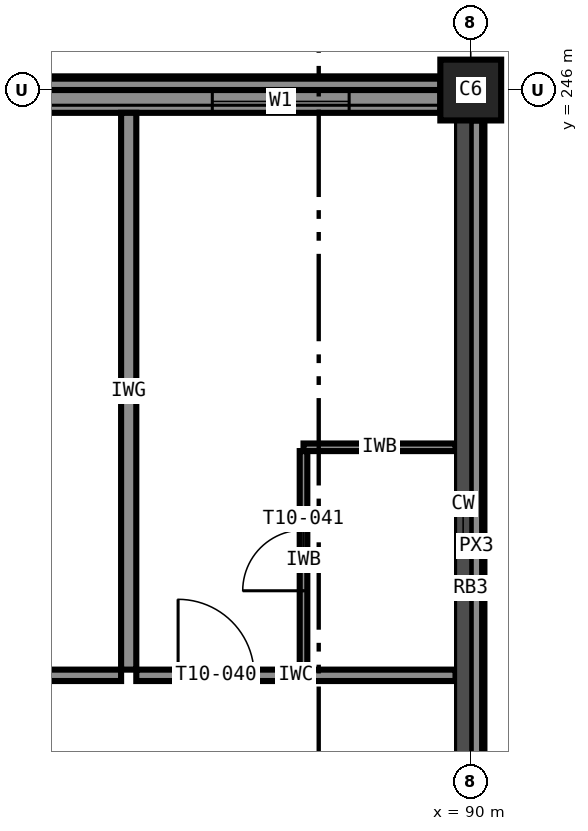
"""IFC4 building model, lengths in metres.
Left out: names, types, materials, properties, quantities, classifications, styles, units other than length and angle.
Written with IfcOpenShell. Run it as: python <this file> out.ifc"""

import sys

from ifc_helpers import new_model, si_unit, direction, frame, frame_2d, origin, origin_2d, place, context, subcontext, project, spatial, rectangle, extrude, element, fill, save


model = new_model("IFC4")
c1 = context("Model", 3, precision=1e-05, world=origin(), true_north=direction((0.0, 1.0)))
c2 = subcontext(c1, "Body", "Model", "MODEL_VIEW")
j1 = project(units=[si_unit("LENGTHUNIT", "METRE"), si_unit("PLANEANGLEUNIT", "RADIAN")], contexts=[c1])
p1 = place(None, origin())
s1 = spatial("IfcSite", under=j1, at=p1, CompositionType="ELEMENT")
p2 = place(p1, origin())
s2 = spatial("IfcBuilding", under=s1, at=p2, CompositionType="ELEMENT")
p3 = place(p2, frame((0.0, 0.0, 42.6)))
s3 = spatial("IfcBuildingStorey", under=s2, at=p3, CompositionType="ELEMENT", Elevation=42.6)
p4 = place(p3, frame((90.0, 246.0, 0.0), z_axis=(0.0, 0.0, 1.0), x_axis=(1.0, 0.0, 0.0)))
e1 = element("IfcColumn", 1, at=p4, inside=s3, PredefinedType="COLUMN", context=c2, shape_type="SweptSolid", body=[
    extrude(rectangle(XDim=0.8, YDim=0.8, at=origin_2d()), origin(), (0.0, 0.0, 1.0), 3.6),
])
p5 = place(p3, frame((90.075, 234.4, 3.4), z_axis=(0.0, 0.0, 1.0), x_axis=(0.0, 1.0, 0.0)))
e2 = element("IfcWall", 2, at=p5, inside=s3, PredefinedType="STANDARD", context=c2, shape_type="SweptSolid", body=[
    extrude(rectangle(XDim=11.2, YDim=0.15, at=frame_2d((5.6, 0.0))), origin(), (0.0, 0.0, 1.0), 0.2),
])
p6 = place(p3, frame((89.6, 245.85, 0.0), z_axis=(0.0, 0.0, 1.0), x_axis=(-1.0, 0.0, 0.0)))
e3 = element("IfcWall", 3, at=p6, inside=s3, PredefinedType="STANDARD", context=c2, shape_type="SweptSolid", body=[
    extrude(rectangle(XDim=11.2, YDim=0.3, at=frame_2d((5.6, 0.0))), origin(), (0.0, 0.0, 1.0), 2.6),
])
p7 = place(p6, frame((6.75, 0.0, 0.85)))
e4 = element("IfcOpeningElement", 4, at=p7, cuts=e3, PredefinedType="OPENING", context=c2, shape_type="SweptSolid", body=[
    extrude(rectangle(XDim=1.8, YDim=1.75, at=frame_2d((0.9, 0.875))), frame((0.0, 0.16, 0.0), z_axis=(0.0, -1.0, 0.0), x_axis=(1.0, 0.0, 0.0)), (0.0, 0.0, 1.0), 0.32),
])
p8 = place(p6, frame((1.2, 0.0, 0.85)))
e5 = element("IfcOpeningElement", 5, at=p8, cuts=e3, PredefinedType="OPENING", context=c2, shape_type="SweptSolid", body=[
    extrude(rectangle(XDim=1.8, YDim=1.75, at=frame_2d((0.9, 0.875))), frame((0.0, 0.16, 0.0), z_axis=(0.0, -1.0, 0.0), x_axis=(1.0, 0.0, 0.0)), (0.0, 0.0, 1.0), 0.32),
])
p9 = place(p3, frame((89.6, 246.075, 3.4), z_axis=(0.0, 0.0, 1.0), x_axis=(-1.0, 0.0, 0.0)))
e6 = element("IfcWall", 6, at=p9, inside=s3, PredefinedType="STANDARD", context=c2, shape_type="SweptSolid", body=[
    extrude(rectangle(XDim=11.2, YDim=0.15, at=frame_2d((5.6, 0.0))), origin(), (0.0, 0.0, 1.0), 0.2),
])
p10 = place(p3, frame((78.1, 238.3, 0.0), z_axis=(0.0, 0.0, 1.0), x_axis=(1.0, 0.0, 0.0)))
e7 = element("IfcWall", 7, at=p10, inside=s3, PredefinedType="PARTITIONING", context=c2, shape_type="SweptSolid", body=[
    extrude(rectangle(XDim=7.3, YDim=0.15, at=frame_2d((3.65, 0.0))), origin(), (0.0, 0.0, 1.0), 3.4),
])
p11 = place(p10, frame((4.35, 0.0, 0.0)))
e8 = element("IfcOpeningElement", 8, at=p11, cuts=e7, PredefinedType="OPENING", context=c2, shape_type="SweptSolid", body=[
    extrude(rectangle(XDim=1.0, YDim=2.1, at=frame_2d((0.5, 1.05))), frame((0.0, 0.085, 0.0), z_axis=(0.0, -1.0, 0.0), x_axis=(1.0, 0.0, 0.0)), (0.0, 0.0, 1.0), 0.17),
])
p12 = place(p3, frame((85.6, 238.3, 0.0), z_axis=(0.0, 0.0, 1.0), x_axis=(1.0, 0.0, 0.0)))
e9 = element("IfcWall", 9, at=p12, inside=s3, PredefinedType="PARTITIONING", context=c2, shape_type="SweptSolid", body=[
    extrude(rectangle(XDim=4.2, YDim=0.15, at=frame_2d((2.1, 0.0))), origin(), (0.0, 0.0, 1.0), 3.4),
])
p13 = place(p12, frame((0.55, 0.0, 0.0)))
e10 = element("IfcOpeningElement", 10, at=p13, cuts=e9, PredefinedType="OPENING", context=c2, shape_type="SweptSolid", body=[
    extrude(rectangle(XDim=1.0, YDim=2.1, at=frame_2d((0.5, 1.05))), frame((0.0, 0.085, 0.0), z_axis=(0.0, -1.0, 0.0), x_axis=(1.0, 0.0, 0.0)), (0.0, 0.0, 1.0), 0.17),
])
p14 = place(p3, frame((87.8, 241.3, 0.0), z_axis=(0.0, 0.0, 1.0), x_axis=(1.0, 0.0, 0.0)))
e11 = element("IfcWall", 11, at=p14, inside=s3, PredefinedType="PARTITIONING", context=c2, shape_type="SweptSolid", body=[
    extrude(rectangle(XDim=2.0, YDim=0.1, at=frame_2d((1.0, 0.0))), origin(), (0.0, 0.0, 1.0), 3.4),
])
p15 = place(p3, frame((87.8, 238.375, 0.0), z_axis=(0.0, 0.0, 1.0), x_axis=(0.0, 1.0, 0.0)))
e12 = element("IfcWall", 12, at=p15, inside=s3, PredefinedType="PARTITIONING", context=c2, shape_type="SweptSolid", body=[
    extrude(rectangle(XDim=2.875, YDim=0.1, at=frame_2d((1.438, 0.0))), origin(), (0.0, 0.0, 1.0), 3.4),
])
p16 = place(p15, frame((1.038, 0.0, 0.0)))
e13 = element("IfcOpeningElement", 13, at=p16, cuts=e12, PredefinedType="OPENING", context=c2, shape_type="SweptSolid", body=[
    extrude(rectangle(XDim=0.8, YDim=2.1, at=frame_2d((0.4, 1.05))), frame((0.0, 0.06, 0.0), z_axis=(0.0, -1.0, 0.0), x_axis=(1.0, 0.0, 0.0)), (0.0, 0.0, 1.0), 0.12),
])
p17 = place(p3, frame((85.5, 245.7, 0.0), z_axis=(0.0, 0.0, 1.0), x_axis=(0.0, -1.0, 0.0)))
e14 = element("IfcWall", 14, at=p17, inside=s3, PredefinedType="PARTITIONING", context=c2, shape_type="SweptSolid", body=[
    extrude(rectangle(XDim=7.325, YDim=0.2, at=frame_2d((3.663, 0.0))), origin(), (0.0, 0.0, 1.0), 3.4),
])
p18 = place(p8, origin())
e15 = element("IfcWindow", 15, at=p18, inside=s3, PartitioningType="SINGLE_PANEL", PredefinedType="WINDOW", context=c2, shape_type="SweptSolid", body=[
    extrude(rectangle(XDim=1.8, YDim=1.75, at=frame_2d((0.9, 0.875))), frame((0.0, 0.03, 0.0), z_axis=(0.0, -1.0, 0.0), x_axis=(1.0, 0.0, 0.0)), (0.0, 0.0, 1.0), 0.06),
])
fill(e5, e15)
p19 = place(p13, origin())
e16 = element("IfcDoor", 16, at=p19, inside=s3, OperationType="SINGLE_SWING_LEFT", PredefinedType="DOOR", context=c2, shape_type="SweptSolid", body=[
    extrude(rectangle(XDim=1.0, YDim=2.1, at=frame_2d((0.5, 1.05))), frame((0.0, 0.025, 0.0), z_axis=(0.0, -1.0, 0.0), x_axis=(1.0, 0.0, 0.0)), (0.0, 0.0, 1.0), 0.05),
])
fill(e10, e16)
p20 = place(p16, origin())
e17 = element("IfcDoor", 17, at=p20, inside=s3, OperationType="SINGLE_SWING_LEFT", PredefinedType="DOOR", context=c2, shape_type="SweptSolid", body=[
    extrude(rectangle(XDim=0.8, YDim=2.1, at=frame_2d((0.4, 1.05))), frame((0.0, 0.025, 0.0), z_axis=(0.0, -1.0, 0.0), x_axis=(1.0, 0.0, 0.0)), (0.0, 0.0, 1.0), 0.05),
])
fill(e13, e17)
save(model, sys.argv[1])
